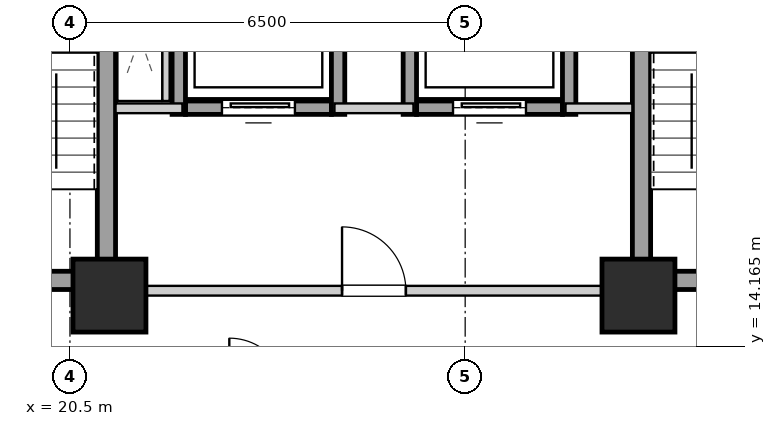
"""IFC4 building model, lengths in metres.
Left out: names, types, materials, properties, quantities, classifications, styles, units other than length and angle.
Written with IfcOpenShell. Run it as: python <this file> out.ifc"""

import sys

from ifc_helpers import new_model, si_unit, direction, frame, frame_2d, origin, origin_2d, place, context, subcontext, project, spatial, rectangle, extrude, element, fill, save


model = new_model("IFC4")
c1 = context("Model", 3, precision=1e-05, world=origin(), true_north=direction((0.0, 1.0)))
c2 = subcontext(c1, "Body", "Model", "MODEL_VIEW")
j1 = project(units=[si_unit("LENGTHUNIT", "METRE"), si_unit("PLANEANGLEUNIT", "RADIAN")], contexts=[c1])
p1 = place(None, origin())
s1 = spatial("IfcSite", under=j1, at=p1, CompositionType="ELEMENT")
p2 = place(p1, origin())
s2 = spatial("IfcBuilding", under=s1, at=p2, CompositionType="ELEMENT")
p3 = place(p2, frame((0.0, 0.0, 67.4)))
s3 = spatial("IfcBuildingStorey", under=s2, at=p3, CompositionType="ELEMENT", Elevation=67.4)
for number, where, z_axis, x_axis in (
    (1, (21.15, 15.0, 0.0), (0.0, 0.0, 1.0), (1.0, 0.0, 0.0)),
    (2, (29.85, 15.0, 0.0), (0.0, 0.0, 1.0), (1.0, 0.0, 0.0)),
):
    element("IfcColumn", number, at=place(p3, frame(where, z_axis=z_axis, x_axis=x_axis)), inside=s3, PredefinedType="COLUMN", context=c2, shape_type="SweptSolid", body=[
        extrude(rectangle(XDim=1.2, YDim=1.2, at=origin_2d()), origin(), (0.0, 0.0, 1.0), 3.2),
    ])
p4 = place(p3, frame((21.1, 15.1, 0.0), z_axis=(0.0, 0.0, 1.0), x_axis=(0.0, 1.0, 0.0)))
e3 = element("IfcWall", 3, at=p4, inside=s3, PredefinedType="SHEAR", context=c2, shape_type="SweptSolid", body=[
    extrude(rectangle(XDim=9.0, YDim=0.3, at=frame_2d((4.5, 0.0))), origin(), (0.0, 0.0, 1.0), 2.88),
])
p5 = place(p3, frame((18.1, 15.25, 0.0), z_axis=(0.0, 0.0, 1.0), x_axis=(1.0, 0.0, 0.0)))
e4 = element("IfcWall", 4, at=p5, inside=s3, PredefinedType="SHEAR", context=c2, shape_type="SweptSolid", body=[
    extrude(rectangle(XDim=2.85, YDim=0.3, at=frame_2d((1.425, 0.0))), origin(), (0.0, 0.0, 1.0), 2.88),
])
p6 = place(p5, frame((0.86, 0.0, 0.0)))
e5 = element("IfcOpeningElement", 5, at=p6, cuts=e4, PredefinedType="OPENING", context=c2, shape_type="SweptSolid", body=[
    extrude(rectangle(XDim=1.1, YDim=2.05, at=frame_2d((0.55, 1.025))), frame((0.0, 0.16, 0.0), z_axis=(0.0, -1.0, 0.0), x_axis=(1.0, 0.0, 0.0)), (0.0, 0.0, 1.0), 0.32),
])
p7 = place(p3, frame((29.9, 15.1, 0.0), z_axis=(0.0, 0.0, 1.0), x_axis=(0.0, 1.0, 0.0)))
e6 = element("IfcWall", 6, at=p7, inside=s3, PredefinedType="SHEAR", context=c2, shape_type="SweptSolid", body=[
    extrude(rectangle(XDim=9.0, YDim=0.3, at=frame_2d((4.5, 0.0))), origin(), (0.0, 0.0, 1.0), 2.88),
])
p8 = place(p3, frame((30.05, 15.25, 0.0), z_axis=(0.0, 0.0, 1.0), x_axis=(1.0, 0.0, 0.0)))
e7 = element("IfcWall", 7, at=p8, inside=s3, PredefinedType="SHEAR", context=c2, shape_type="SweptSolid", body=[
    extrude(rectangle(XDim=2.85, YDim=0.3, at=frame_2d((1.425, 0.0))), origin(), (0.0, 0.0, 1.0), 2.88),
])
p9 = place(p8, frame((0.86, 0.0, 0.0)))
e8 = element("IfcOpeningElement", 8, at=p9, cuts=e7, PredefinedType="OPENING", context=c2, shape_type="SweptSolid", body=[
    extrude(rectangle(XDim=1.1, YDim=2.05, at=frame_2d((0.55, 1.025))), frame((0.0, 0.16, 0.0), z_axis=(0.0, -1.0, 0.0), x_axis=(1.0, 0.0, 0.0)), (0.0, 0.0, 1.0), 0.32),
])
p10 = place(p3, frame((22.4, 18.09, 0.0), z_axis=(0.0, 0.0, 1.0), x_axis=(1.0, 0.0, 0.0)))
e9 = element("IfcWall", 9, at=p10, inside=s3, PredefinedType="SHEAR", context=c2, shape_type="SweptSolid", body=[
    extrude(rectangle(XDim=2.4, YDim=0.22, at=frame_2d((1.2, 0.0))), origin(), (0.0, 0.0, 1.0), 2.88),
])
p11 = place(p10, frame((0.6, 0.0, 0.0)))
e10 = element("IfcOpeningElement", 10, at=p11, cuts=e9, PredefinedType="OPENING", context=c2, shape_type="SweptSolid", body=[
    extrude(rectangle(XDim=1.2, YDim=2.15, at=frame_2d((0.6, 1.075))), frame((0.0, 0.12, 0.0), z_axis=(0.0, -1.0, 0.0), x_axis=(1.0, 0.0, 0.0)), (0.0, 0.0, 1.0), 0.24),
])
for number, where, z_axis, x_axis in (
    (11, (22.29, 17.98, 0.0), (0.0, 0.0, 1.0), (0.0, 1.0, 0.0)),
    (12, (24.91, 17.98, 0.0), (0.0, 0.0, 1.0), (0.0, 1.0, 0.0)),
):
    element("IfcWall", number, at=place(p3, frame(where, z_axis=z_axis, x_axis=x_axis)), inside=s3, PredefinedType="SHEAR", context=c2, shape_type="SweptSolid", body=[
        extrude(rectangle(XDim=2.54, YDim=0.22, at=frame_2d((1.27, 0.0))), origin(), (0.0, 0.0, 1.0), 2.88),
    ])
p12 = place(p3, frame((26.2, 18.09, 0.0), z_axis=(0.0, 0.0, 1.0), x_axis=(1.0, 0.0, 0.0)))
e13 = element("IfcWall", 13, at=p12, inside=s3, PredefinedType="SHEAR", context=c2, shape_type="SweptSolid", body=[
    extrude(rectangle(XDim=2.4, YDim=0.22, at=frame_2d((1.2, 0.0))), origin(), (0.0, 0.0, 1.0), 2.88),
])
p13 = place(p12, frame((0.6, 0.0, 0.0)))
e14 = element("IfcOpeningElement", 14, at=p13, cuts=e13, PredefinedType="OPENING", context=c2, shape_type="SweptSolid", body=[
    extrude(rectangle(XDim=1.2, YDim=2.15, at=frame_2d((0.6, 1.075))), frame((0.0, 0.12, 0.0), z_axis=(0.0, -1.0, 0.0), x_axis=(1.0, 0.0, 0.0)), (0.0, 0.0, 1.0), 0.24),
])
for number, where, z_axis, x_axis in (
    (15, (26.09, 17.98, 0.0), (0.0, 0.0, 1.0), (0.0, 1.0, 0.0)),
    (16, (28.71, 17.98, 0.0), (0.0, 0.0, 1.0), (0.0, 1.0, 0.0)),
):
    element("IfcWall", number, at=place(p3, frame(where, z_axis=z_axis, x_axis=x_axis)), inside=s3, PredefinedType="SHEAR", context=c2, shape_type="SweptSolid", body=[
        extrude(rectangle(XDim=2.54, YDim=0.22, at=frame_2d((1.27, 0.0))), origin(), (0.0, 0.0, 1.0), 2.88),
    ])
p14 = place(p3, frame((21.25, 15.08, 0.0), z_axis=(0.0, 0.0, 1.0), x_axis=(1.0, 0.0, 0.0)))
e17 = element("IfcWall", 17, at=p14, inside=s3, PredefinedType="PARTITIONING", context=c2, shape_type="SweptSolid", body=[
    extrude(rectangle(XDim=8.5, YDim=0.16, at=frame_2d((4.25, 0.0))), origin(), (0.0, 0.0, 1.0), 2.172),
])
p15 = place(p14, frame((3.725, 0.0, 0.0)))
e18 = element("IfcOpeningElement", 18, at=p15, cuts=e17, PredefinedType="OPENING", context=c2, shape_type="SweptSolid", body=[
    extrude(rectangle(XDim=1.05, YDim=2.05, at=frame_2d((0.525, 1.025))), frame((0.0, 0.09, 0.0), z_axis=(0.0, -1.0, 0.0), x_axis=(1.0, 0.0, 0.0)), (0.0, 0.0, 1.0), 0.18),
])
p16 = place(p3, frame((21.25, 18.08, 0.0), z_axis=(0.0, 0.0, 1.0), x_axis=(1.0, 0.0, 0.0)))
e19 = element("IfcWall", 19, at=p16, inside=s3, PredefinedType="PARTITIONING", context=c2, shape_type="SweptSolid", body=[
    extrude(rectangle(XDim=1.1, YDim=0.16, at=frame_2d((0.55, 0.0))), origin(), (0.0, 0.0, 1.0), 2.88),
])
p17 = place(p3, frame((24.85, 18.08, 0.0), z_axis=(0.0, 0.0, 1.0), x_axis=(1.0, 0.0, 0.0)))
e20 = element("IfcWall", 20, at=p17, inside=s3, PredefinedType="PARTITIONING", context=c2, shape_type="SweptSolid", body=[
    extrude(rectangle(XDim=1.3, YDim=0.16, at=frame_2d((0.65, 0.0))), origin(), (0.0, 0.0, 1.0), 2.88),
])
p18 = place(p3, frame((28.65, 18.08, 0.0), z_axis=(0.0, 0.0, 1.0), x_axis=(1.0, 0.0, 0.0)))
e21 = element("IfcWall", 21, at=p18, inside=s3, PredefinedType="PARTITIONING", context=c2, shape_type="SweptSolid", body=[
    extrude(rectangle(XDim=1.1, YDim=0.16, at=frame_2d((0.55, 0.0))), origin(), (0.0, 0.0, 1.0), 2.88),
])
p19 = place(p3, frame((22.08, 18.2, 0.0), z_axis=(0.0, 0.0, 1.0), x_axis=(0.0, 1.0, 0.0)))
e22 = element("IfcWall", 22, at=p19, inside=s3, PredefinedType="PARTITIONING", context=c2, shape_type="SweptSolid", body=[
    extrude(rectangle(XDim=2.12, YDim=0.12, at=frame_2d((1.06, 0.0))), origin(), (0.0, 0.0, 1.0), 2.88),
])
p20 = place(p11, origin())
e23 = element("IfcDoor", 23, at=p20, inside=s3, OperationType="SLIDING_TO_LEFT", PredefinedType="DOOR", context=c2, shape_type="SweptSolid", body=[
    extrude(rectangle(XDim=1.2, YDim=2.15, at=frame_2d((0.6, 1.075))), frame((0.0, 0.025, 0.0), z_axis=(0.0, -1.0, 0.0), x_axis=(1.0, 0.0, 0.0)), (0.0, 0.0, 1.0), 0.05),
])
fill(e10, e23)
p21 = place(p13, origin())
e24 = element("IfcDoor", 24, at=p21, inside=s3, OperationType="SLIDING_TO_LEFT", PredefinedType="DOOR", context=c2, shape_type="SweptSolid", body=[
    extrude(rectangle(XDim=1.2, YDim=2.15, at=frame_2d((0.6, 1.075))), frame((0.0, 0.025, 0.0), z_axis=(0.0, -1.0, 0.0), x_axis=(1.0, 0.0, 0.0)), (0.0, 0.0, 1.0), 0.05),
])
fill(e14, e24)
p22 = place(p15, origin())
e25 = element("IfcDoor", 25, at=p22, inside=s3, OperationType="SINGLE_SWING_LEFT", PredefinedType="DOOR", context=c2, shape_type="SweptSolid", body=[
    extrude(rectangle(XDim=1.05, YDim=2.05, at=frame_2d((0.525, 1.025))), frame((0.0, 0.025, 0.0), z_axis=(0.0, -1.0, 0.0), x_axis=(1.0, 0.0, 0.0)), (0.0, 0.0, 1.0), 0.05),
])
fill(e18, e25)
save(model, sys.argv[1])
